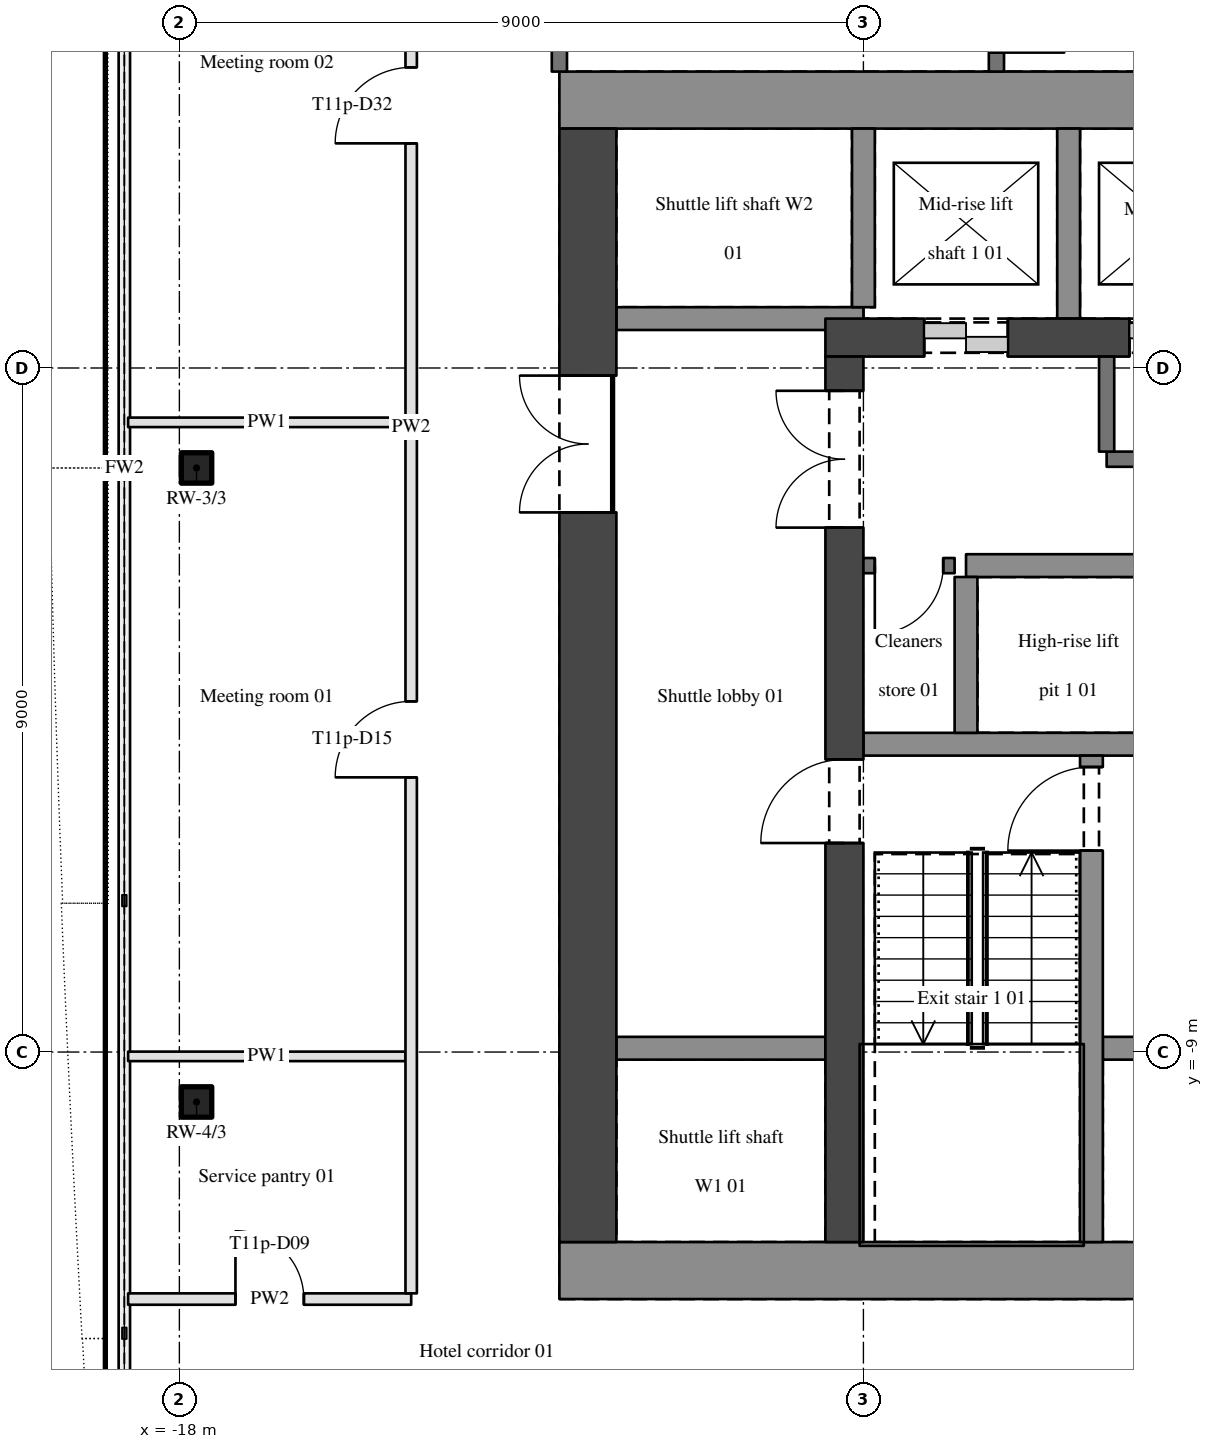
"""IFC4 building model, lengths in metres.
Left out: names, types, materials, properties, quantities, classifications, styles, units other than length and angle.
Written with IfcOpenShell. Run it as: python <this file> out.ifc"""

import sys

from ifc_helpers import new_model, si_unit, direction, frame, frame_2d, origin, origin_2d, place, context, subcontext, project, spatial, rectangle, hollow_rectangle, extrude, element, fill, save


model = new_model("IFC4")
c1 = context("Model", 3, precision=1e-05, world=origin(), true_north=direction((0.0, 1.0)))
c2 = subcontext(c1, "Body", "Model", "MODEL_VIEW")
j1 = project(units=[si_unit("LENGTHUNIT", "METRE"), si_unit("PLANEANGLEUNIT", "RADIAN")], contexts=[c1])
p1 = place(None, origin())
s1 = spatial("IfcSite", under=j1, at=p1, CompositionType="ELEMENT")
p2 = place(p1, origin())
s2 = spatial("IfcBuilding", under=s1, at=p2, CompositionType="ELEMENT")
p3 = place(p2, frame((0.0, 0.0, 158.9)))
s3 = spatial("IfcBuildingStorey", under=s2, at=p3, CompositionType="ELEMENT", Elevation=158.9)
for number, where, z_axis, x_axis in (
    (1, (-17.774, -1.315, 0.0), (0.0, 0.0, 1.0), (1.0, 0.0, 0.0)),
    (2, (-17.774, -9.657, 0.0), (0.0, 0.0, 1.0), (1.0, 0.0, 0.0)),
):
    element("IfcColumn", number, at=place(p3, frame(where, z_axis=z_axis, x_axis=x_axis)), inside=s3, PredefinedType="COLUMN", context=c2, shape_type="SweptSolid", body=[
        extrude(hollow_rectangle(XDim=0.4, YDim=0.4, WallThickness=0.02, InnerFilletRadius=0.03, OuterFilletRadius=0.05, at=origin_2d()), origin(), (0.0, 0.0, 1.0), 3.4),
    ])
for number, where, z_axis, x_axis in (
    (3, (-13.0, -11.875, 0.0), (0.0, 0.0, 1.0), (1.0, 0.0, 0.0)),
    (4, (-13.0, 3.525, 0.0), (0.0, 0.0, 1.0), (1.0, 0.0, 0.0)),
):
    element("IfcWall", number, at=place(p3, frame(where, z_axis=z_axis, x_axis=x_axis)), inside=s3, PredefinedType="SHEAR", context=c2, shape_type="SweptSolid", body=[
        extrude(rectangle(XDim=26.0, YDim=0.75, at=frame_2d((13.0, 0.0))), origin(), (0.0, 0.0, 1.0), 3.4),
    ])
p4 = place(p3, frame((-12.625, -11.5, 0.0), z_axis=(0.0, 0.0, 1.0), x_axis=(0.0, 1.0, 0.0)))
e5 = element("IfcWall", 5, at=p4, inside=s3, PredefinedType="SHEAR", context=c2, shape_type="SweptSolid", body=[
    extrude(rectangle(XDim=14.65, YDim=0.75, at=frame_2d((7.325, 0.0))), origin(), (0.0, 0.0, 1.0), 3.4),
])
p5 = place(p4, frame((9.6, 0.0, 0.0)))
e6 = element("IfcOpeningElement", 6, at=p5, cuts=e5, PredefinedType="OPENING", context=c2, shape_type="SweptSolid", body=[
    extrude(rectangle(XDim=1.8, YDim=2.1, at=frame_2d((0.9, 1.05))), frame((0.0, 0.385, 0.0), z_axis=(0.0, -1.0, 0.0), x_axis=(1.0, 0.0, 0.0)), (0.0, 0.0, 1.0), 0.77),
])
p6 = place(p3, frame((-9.5, 0.4, 0.0), z_axis=(0.0, 0.0, 1.0), x_axis=(1.0, 0.0, 0.0)))
e7 = element("IfcWall", 7, at=p6, inside=s3, PredefinedType="SHEAR", context=c2, shape_type="SweptSolid", body=[
    extrude(rectangle(XDim=19.0, YDim=0.5, at=frame_2d((9.5, 0.0))), origin(), (0.0, 0.0, 1.0), 3.4),
])
p7 = place(p6, frame((1.3, 0.0, 0.0)))
e8 = element("IfcOpeningElement", 8, at=p7, cuts=e7, PredefinedType="OPENING", context=c2, shape_type="SweptSolid", body=[
    extrude(rectangle(XDim=1.1, YDim=2.1, at=frame_2d((0.55, 1.05))), frame((0.0, 0.26, 0.0), z_axis=(0.0, -1.0, 0.0), x_axis=(1.0, 0.0, 0.0)), (0.0, 0.0, 1.0), 0.52),
])
p8 = place(p6, frame((4.0, 0.0, 0.0)))
e9 = element("IfcOpeningElement", 9, at=p8, cuts=e7, PredefinedType="OPENING", context=c2, shape_type="SweptSolid", body=[
    extrude(rectangle(XDim=1.1, YDim=2.1, at=frame_2d((0.55, 1.05))), frame((0.0, 0.26, 0.0), z_axis=(0.0, -1.0, 0.0), x_axis=(1.0, 0.0, 0.0)), (0.0, 0.0, 1.0), 0.52),
])
p9 = place(p6, frame((6.7, 0.0, 0.0)))
e10 = element("IfcOpeningElement", 10, at=p9, cuts=e7, PredefinedType="OPENING", context=c2, shape_type="SweptSolid", body=[
    extrude(rectangle(XDim=1.1, YDim=2.1, at=frame_2d((0.55, 1.05))), frame((0.0, 0.26, 0.0), z_axis=(0.0, -1.0, 0.0), x_axis=(1.0, 0.0, 0.0)), (0.0, 0.0, 1.0), 0.52),
])
p10 = place(p6, frame((11.2, 0.0, 0.0)))
e11 = element("IfcOpeningElement", 11, at=p10, cuts=e7, PredefinedType="OPENING", context=c2, shape_type="SweptSolid", body=[
    extrude(rectangle(XDim=1.1, YDim=2.1, at=frame_2d((0.55, 1.05))), frame((0.0, 0.26, 0.0), z_axis=(0.0, -1.0, 0.0), x_axis=(1.0, 0.0, 0.0)), (0.0, 0.0, 1.0), 0.52),
])
p11 = place(p6, frame((13.9, 0.0, 0.0)))
e12 = element("IfcOpeningElement", 12, at=p11, cuts=e7, PredefinedType="OPENING", context=c2, shape_type="SweptSolid", body=[
    extrude(rectangle(XDim=1.1, YDim=2.1, at=frame_2d((0.55, 1.05))), frame((0.0, 0.26, 0.0), z_axis=(0.0, -1.0, 0.0), x_axis=(1.0, 0.0, 0.0)), (0.0, 0.0, 1.0), 0.52),
])
p12 = place(p6, frame((16.6, 0.0, 0.0)))
e13 = element("IfcOpeningElement", 13, at=p12, cuts=e7, PredefinedType="OPENING", context=c2, shape_type="SweptSolid", body=[
    extrude(rectangle(XDim=1.1, YDim=2.1, at=frame_2d((0.55, 1.05))), frame((0.0, 0.26, 0.0), z_axis=(0.0, -1.0, 0.0), x_axis=(1.0, 0.0, 0.0)), (0.0, 0.0, 1.0), 0.52),
])
p13 = place(p3, frame((-9.25, -11.5, 0.0), z_axis=(0.0, 0.0, 1.0), x_axis=(0.0, 1.0, 0.0)))
e14 = element("IfcWall", 14, at=p13, inside=s3, PredefinedType="SHEAR", context=c2, shape_type="SweptSolid", body=[
    extrude(rectangle(XDim=11.65, YDim=0.5, at=frame_2d((5.825, 0.0))), origin(), (0.0, 0.0, 1.0), 3.4),
])
p14 = place(p13, frame((9.4, 0.0, 0.0)))
e15 = element("IfcOpeningElement", 15, at=p14, cuts=e14, PredefinedType="OPENING", context=c2, shape_type="SweptSolid", body=[
    extrude(rectangle(XDim=1.8, YDim=2.1, at=frame_2d((0.9, 1.05))), frame((0.0, 0.26, 0.0), z_axis=(0.0, -1.0, 0.0), x_axis=(1.0, 0.0, 0.0)), (0.0, 0.0, 1.0), 0.52),
])
p15 = place(p13, frame((5.25, 0.0, 0.0)))
e16 = element("IfcOpeningElement", 16, at=p15, cuts=e14, PredefinedType="OPENING", context=c2, shape_type="SweptSolid", body=[
    extrude(rectangle(XDim=1.1, YDim=2.1, at=frame_2d((0.55, 1.05))), frame((0.0, 0.26, 0.0), z_axis=(0.0, -1.0, 0.0), x_axis=(1.0, 0.0, 0.0)), (0.0, 0.0, 1.0), 0.52),
])
p16 = place(p3, frame((-18.674, -12.25, 0.0), z_axis=(0.0, 0.0, 1.0), x_axis=(1.0, 0.0, 0.0)))
e17 = element("IfcWall", 17, at=p16, inside=s3, PredefinedType="PARTITIONING", context=c2, shape_type="SweptSolid", body=[
    extrude(rectangle(XDim=3.724, YDim=0.15, at=frame_2d((1.862, 0.0))), origin(), (0.0, 0.0, 1.0), 2.46),
])
p17 = place(p16, frame((1.412, 0.0, 0.0)))
e18 = element("IfcOpeningElement", 18, at=p17, cuts=e17, PredefinedType="OPENING", context=c2, shape_type="SweptSolid", body=[
    extrude(rectangle(XDim=0.9, YDim=2.1, at=frame_2d((0.45, 1.05))), frame((0.0, 0.085, 0.0), z_axis=(0.0, -1.0, 0.0), x_axis=(1.0, 0.0, 0.0)), (0.0, 0.0, 1.0), 0.17),
])
p18 = place(p3, frame((-18.674, -9.057, 0.0), z_axis=(0.0, 0.0, 1.0), x_axis=(1.0, 0.0, 0.0)))
e19 = element("IfcWall", 19, at=p18, inside=s3, PredefinedType="PARTITIONING", context=c2, shape_type="SweptSolid", body=[
    extrude(rectangle(XDim=3.649, YDim=0.125, at=frame_2d((1.825, 0.0))), origin(), (0.0, 0.0, 1.0), 2.46),
])
p19 = place(p3, frame((-12.25, -8.95, 0.0), z_axis=(0.0, 0.0, 1.0), x_axis=(1.0, 0.0, 0.0)))
e20 = element("IfcWall", 20, at=p19, inside=s3, PredefinedType="SHEAR", context=c2, shape_type="SweptSolid", body=[
    extrude(rectangle(XDim=2.75, YDim=0.3, at=frame_2d((1.375, 0.0))), origin(), (0.0, 0.0, 1.0), 3.4),
])
p20 = place(p3, frame((-5.85, -8.95, 0.0), z_axis=(0.0, 0.0, 1.0), x_axis=(1.0, 0.0, 0.0)))
e21 = element("IfcWall", 21, at=p20, inside=s3, PredefinedType="SHEAR", context=c2, shape_type="SweptSolid", body=[
    extrude(rectangle(XDim=11.7, YDim=0.3, at=frame_2d((5.85, 0.0))), origin(), (0.0, 0.0, 1.0), 3.4),
])
p21 = place(p20, frame((0.8, 0.0, 0.0)))
e22 = element("IfcOpeningElement", 22, at=p21, cuts=e21, PredefinedType="OPENING", context=c2, shape_type="SweptSolid", body=[
    extrude(rectangle(XDim=1.1, YDim=2.1, at=frame_2d((0.55, 1.05))), frame((0.0, 0.16, 0.0), z_axis=(0.0, -1.0, 0.0), x_axis=(1.0, 0.0, 0.0)), (0.0, 0.0, 1.0), 0.32),
])
p22 = place(p20, frame((3.8, 0.0, 0.0)))
e23 = element("IfcOpeningElement", 23, at=p22, cuts=e21, PredefinedType="OPENING", context=c2, shape_type="SweptSolid", body=[
    extrude(rectangle(XDim=1.1, YDim=2.1, at=frame_2d((0.55, 1.05))), frame((0.0, 0.16, 0.0), z_axis=(0.0, -1.0, 0.0), x_axis=(1.0, 0.0, 0.0)), (0.0, 0.0, 1.0), 0.32),
])
p23 = place(p20, frame((6.8, 0.0, 0.0)))
e24 = element("IfcOpeningElement", 24, at=p23, cuts=e21, PredefinedType="OPENING", context=c2, shape_type="SweptSolid", body=[
    extrude(rectangle(XDim=1.1, YDim=2.1, at=frame_2d((0.55, 1.05))), frame((0.0, 0.16, 0.0), z_axis=(0.0, -1.0, 0.0), x_axis=(1.0, 0.0, 0.0)), (0.0, 0.0, 1.0), 0.32),
])
p24 = place(p20, frame((9.8, 0.0, 0.0)))
e25 = element("IfcOpeningElement", 25, at=p24, cuts=e21, PredefinedType="OPENING", context=c2, shape_type="SweptSolid", body=[
    extrude(rectangle(XDim=1.1, YDim=2.1, at=frame_2d((0.55, 1.05))), frame((0.0, 0.16, 0.0), z_axis=(0.0, -1.0, 0.0), x_axis=(1.0, 0.0, 0.0)), (0.0, 0.0, 1.0), 0.32),
])
p25 = place(p3, frame((-9.0, -4.95, 0.0), z_axis=(0.0, 0.0, 1.0), x_axis=(1.0, 0.0, 0.0)))
e26 = element("IfcWall", 26, at=p25, inside=s3, PredefinedType="SHEAR", context=c2, shape_type="SweptSolid", body=[
    extrude(rectangle(XDim=6.75, YDim=0.3, at=frame_2d((3.375, 0.0))), origin(), (0.0, 0.0, 1.0), 3.4),
])
p26 = place(p3, frame((-7.8, -2.6, 0.0), z_axis=(0.0, 0.0, 1.0), x_axis=(-1.0, 0.0, 0.0)))
e27 = element("IfcWall", 27, at=p26, inside=s3, PredefinedType="SOLIDWALL", context=c2, shape_type="SweptSolid", body=[
    extrude(rectangle(XDim=1.2, YDim=0.2, at=frame_2d((0.6, 0.0))), origin(), (0.0, 0.0, 1.0), 3.1),
])
p27 = place(p26, frame((0.15, 0.0, 0.0)))
e28 = element("IfcOpeningElement", 28, at=p27, cuts=e27, PredefinedType="OPENING", context=c2, shape_type="SweptSolid", body=[
    extrude(rectangle(XDim=0.9, YDim=2.1, at=frame_2d((0.45, 1.05))), frame((0.0, 0.11, 0.0), z_axis=(0.0, -1.0, 0.0), x_axis=(1.0, 0.0, 0.0)), (0.0, 0.0, 1.0), 0.22),
])
p28 = place(p3, frame((-7.65, -2.6, 0.0), z_axis=(0.0, 0.0, 1.0), x_axis=(1.0, 0.0, 0.0)))
e29 = element("IfcWall", 29, at=p28, inside=s3, PredefinedType="SHEAR", context=c2, shape_type="SweptSolid", body=[
    extrude(rectangle(XDim=5.4, YDim=0.3, at=frame_2d((2.7, 0.0))), origin(), (0.0, 0.0, 1.0), 3.4),
])
p29 = place(p3, frame((-5.8, -1.2, 0.0), z_axis=(0.0, 0.0, 1.0), x_axis=(1.0, 0.0, 0.0)))
e30 = element("IfcWall", 30, at=p29, inside=s3, PredefinedType="SOLIDWALL", context=c2, shape_type="SweptSolid", body=[
    extrude(rectangle(XDim=4.6, YDim=0.2, at=frame_2d((2.3, 0.0))), origin(), (0.0, 0.0, 1.0), 3.1),
])
p30 = place(p29, frame((1.85, 0.0, 0.0)))
e31 = element("IfcOpeningElement", 31, at=p30, cuts=e30, PredefinedType="OPENING", context=c2, shape_type="SweptSolid", body=[
    extrude(rectangle(XDim=0.9, YDim=2.1, at=frame_2d((0.45, 1.05))), frame((0.0, 0.11, 0.0), z_axis=(0.0, -1.0, 0.0), x_axis=(1.0, 0.0, 0.0)), (0.0, 0.0, 1.0), 0.22),
])
p31 = place(p3, frame((-18.674, -0.715, 0.0), z_axis=(0.0, 0.0, 1.0), x_axis=(1.0, 0.0, 0.0)))
e32 = element("IfcWall", 32, at=p31, inside=s3, PredefinedType="PARTITIONING", context=c2, shape_type="SweptSolid", body=[
    extrude(rectangle(XDim=3.649, YDim=0.125, at=frame_2d((1.825, 0.0))), origin(), (0.0, 0.0, 1.0), 2.46),
])
p32 = place(p3, frame((-9.0, 0.65, 0.0), z_axis=(0.0, 0.0, 1.0), x_axis=(-1.0, 0.0, 0.0)))
e33 = element("IfcWall", 33, at=p32, inside=s3, PredefinedType="SHEAR", context=c2, shape_type="SweptSolid", body=[
    extrude(rectangle(XDim=3.25, YDim=0.3, at=frame_2d((1.625, 0.0))), origin(), (0.0, 0.0, 1.0), 3.4),
])
p33 = place(p3, frame((-14.95, -12.175, 0.0), z_axis=(0.0, 0.0, 1.0), x_axis=(0.0, 1.0, 0.0)))
e34 = element("IfcWall", 34, at=p33, inside=s3, PredefinedType="PARTITIONING", context=c2, shape_type="SweptSolid", body=[
    extrude(rectangle(XDim=22.8, YDim=0.15, at=frame_2d((11.4, 0.0))), origin(), (0.0, 0.0, 1.0), 2.46),
])
p34 = place(p33, frame((6.789, 0.0, 0.0)))
e35 = element("IfcOpeningElement", 35, at=p34, cuts=e34, PredefinedType="OPENING", context=c2, shape_type="SweptSolid", body=[
    extrude(rectangle(XDim=1.0, YDim=2.1, at=frame_2d((0.5, 1.05))), frame((0.0, 0.085, 0.0), z_axis=(0.0, -1.0, 0.0), x_axis=(1.0, 0.0, 0.0)), (0.0, 0.0, 1.0), 0.17),
])
p35 = place(p33, frame((15.131, 0.0, 0.0)))
e36 = element("IfcOpeningElement", 36, at=p35, cuts=e34, PredefinedType="OPENING", context=c2, shape_type="SweptSolid", body=[
    extrude(rectangle(XDim=1.0, YDim=2.1, at=frame_2d((0.5, 1.05))), frame((0.0, 0.085, 0.0), z_axis=(0.0, -1.0, 0.0), x_axis=(1.0, 0.0, 0.0)), (0.0, 0.0, 1.0), 0.17),
])
p36 = place(p3, frame((-13.0, 3.9, 0.0), z_axis=(0.0, 0.0, 1.0), x_axis=(0.0, 1.0, 0.0)))
e37 = element("IfcWall", 37, at=p36, inside=s3, PredefinedType="SOLIDWALL", context=c2, shape_type="SweptSolid", body=[
    extrude(rectangle(XDim=6.7, YDim=0.2, at=frame_2d((3.35, 0.0))), origin(), (0.0, 0.0, 1.0), 2.46),
])
p37 = place(p3, frame((-9.0, 0.8, 0.0), z_axis=(0.0, 0.0, 1.0), x_axis=(0.0, 1.0, 0.0)))
e38 = element("IfcWall", 38, at=p37, inside=s3, PredefinedType="SHEAR", context=c2, shape_type="SweptSolid", body=[
    extrude(rectangle(XDim=2.35, YDim=0.3, at=frame_2d((1.175, 0.0))), origin(), (0.0, 0.0, 1.0), 3.4),
])
p38 = place(p3, frame((-7.65, -4.8, 0.0), z_axis=(0.0, 0.0, 1.0), x_axis=(0.0, 1.0, 0.0)))
e39 = element("IfcWall", 39, at=p38, inside=s3, PredefinedType="SHEAR", context=c2, shape_type="SweptSolid", body=[
    extrude(rectangle(XDim=2.05, YDim=0.3, at=frame_2d((1.025, 0.0))), origin(), (0.0, 0.0, 1.0), 3.4),
])
p39 = place(p3, frame((-7.25, 5.3, 0.0), z_axis=(0.0, 0.0, 1.0), x_axis=(0.0, -1.0, 0.0)))
e40 = element("IfcWall", 40, at=p39, inside=s3, PredefinedType="SOLIDWALL", context=c2, shape_type="SweptSolid", body=[
    extrude(rectangle(XDim=1.4, YDim=0.2, at=frame_2d((0.7, 0.0))), origin(), (0.0, 0.0, 1.0), 2.46),
])
p40 = place(p39, frame((0.25, 0.0, 0.0)))
e41 = element("IfcOpeningElement", 41, at=p40, cuts=e40, PredefinedType="OPENING", context=c2, shape_type="SweptSolid", body=[
    extrude(rectangle(XDim=0.9, YDim=2.1, at=frame_2d((0.45, 1.05))), frame((0.0, 0.11, 0.0), z_axis=(0.0, -1.0, 0.0), x_axis=(1.0, 0.0, 0.0)), (0.0, 0.0, 1.0), 0.22),
])
p41 = place(p3, frame((-6.3, 0.65, 0.0), z_axis=(0.0, 0.0, 1.0), x_axis=(0.0, 1.0, 0.0)))
e42 = element("IfcWall", 42, at=p41, inside=s3, PredefinedType="SHEAR", context=c2, shape_type="SweptSolid", body=[
    extrude(rectangle(XDim=2.5, YDim=0.3, at=frame_2d((1.25, 0.0))), origin(), (0.0, 0.0, 1.0), 3.4),
])
p42 = place(p3, frame((-6.0, -11.5, 0.0), z_axis=(0.0, 0.0, 1.0), x_axis=(0.0, 1.0, 0.0)))
e43 = element("IfcWall", 43, at=p42, inside=s3, PredefinedType="SHEAR", context=c2, shape_type="SweptSolid", body=[
    extrude(rectangle(XDim=6.4, YDim=0.3, at=frame_2d((3.2, 0.0))), origin(), (0.0, 0.0, 1.0), 3.4),
])
p43 = place(p42, frame((5.15, 0.0, 0.0)))
e44 = element("IfcOpeningElement", 44, at=p43, cuts=e43, PredefinedType="OPENING", context=c2, shape_type="SweptSolid", body=[
    extrude(rectangle(XDim=1.1, YDim=2.1, at=frame_2d((0.55, 1.05))), frame((0.0, 0.16, 0.0), z_axis=(0.0, -1.0, 0.0), x_axis=(1.0, 0.0, 0.0)), (0.0, 0.0, 1.0), 0.32),
])
p44 = place(p3, frame((-5.8, -1.1, 0.0), z_axis=(0.0, 0.0, 1.0), x_axis=(0.0, 1.0, 0.0)))
e45 = element("IfcWall", 45, at=p44, inside=s3, PredefinedType="SOLIDWALL", context=c2, shape_type="SweptSolid", body=[
    extrude(rectangle(XDim=1.25, YDim=0.2, at=frame_2d((0.625, 0.0))), origin(), (0.0, 0.0, 1.0), 3.1),
])
p45 = place(p5, origin())
e46 = element("IfcDoor", 46, at=p45, inside=s3, OperationType="DOUBLE_DOOR_SINGLE_SWING", PredefinedType="DOOR", context=c2, shape_type="SweptSolid", body=[
    extrude(rectangle(XDim=1.8, YDim=2.1, at=frame_2d((0.9, 1.05))), frame((0.0, 0.025, 0.0), z_axis=(0.0, -1.0, 0.0), x_axis=(1.0, 0.0, 0.0)), (0.0, 0.0, 1.0), 0.05),
])
fill(e6, e46)
p46 = place(p14, origin())
e47 = element("IfcDoor", 47, at=p46, inside=s3, OperationType="DOUBLE_DOOR_SINGLE_SWING", PredefinedType="DOOR", context=c2, shape_type="SweptSolid", body=[
    extrude(rectangle(XDim=1.8, YDim=2.1, at=frame_2d((0.9, 1.05))), frame((0.0, 0.025, 0.0), z_axis=(0.0, -1.0, 0.0), x_axis=(1.0, 0.0, 0.0)), (0.0, 0.0, 1.0), 0.05),
])
fill(e15, e47)
p47 = place(p43, origin())
e48 = element("IfcDoor", 48, at=p47, inside=s3, OperationType="SINGLE_SWING_LEFT", PredefinedType="DOOR", context=c2, shape_type="SweptSolid", body=[
    extrude(rectangle(XDim=1.1, YDim=2.1, at=frame_2d((0.55, 1.05))), frame((0.0, 0.025, 0.0), z_axis=(0.0, -1.0, 0.0), x_axis=(1.0, 0.0, 0.0)), (0.0, 0.0, 1.0), 0.05),
])
fill(e44, e48)
p48 = place(p15, origin())
e49 = element("IfcDoor", 49, at=p48, inside=s3, OperationType="SINGLE_SWING_LEFT", PredefinedType="DOOR", context=c2, shape_type="SweptSolid", body=[
    extrude(rectangle(XDim=1.1, YDim=2.1, at=frame_2d((0.55, 1.05))), frame((0.0, 0.025, 0.0), z_axis=(0.0, -1.0, 0.0), x_axis=(1.0, 0.0, 0.0)), (0.0, 0.0, 1.0), 0.05),
])
fill(e16, e49)
p49 = place(p27, origin())
e50 = element("IfcDoor", 50, at=p49, inside=s3, OperationType="SINGLE_SWING_RIGHT", PredefinedType="DOOR", context=c2, shape_type="SweptSolid", body=[
    extrude(rectangle(XDim=0.9, YDim=2.1, at=frame_2d((0.45, 1.05))), frame((0.0, 0.025, 0.0), z_axis=(0.0, -1.0, 0.0), x_axis=(1.0, 0.0, 0.0)), (0.0, 0.0, 1.0), 0.05),
])
fill(e28, e50)
p50 = place(p17, origin())
e51 = element("IfcDoor", 51, at=p50, inside=s3, OperationType="SINGLE_SWING_LEFT", PredefinedType="DOOR", context=c2, shape_type="SweptSolid", body=[
    extrude(rectangle(XDim=0.9, YDim=2.1, at=frame_2d((0.45, 1.05))), frame((0.0, 0.025, 0.0), z_axis=(0.0, -1.0, 0.0), x_axis=(1.0, 0.0, 0.0)), (0.0, 0.0, 1.0), 0.05),
])
fill(e18, e51)
p51 = place(p34, origin())
e52 = element("IfcDoor", 52, at=p51, inside=s3, OperationType="SINGLE_SWING_LEFT", PredefinedType="DOOR", context=c2, shape_type="SweptSolid", body=[
    extrude(rectangle(XDim=1.0, YDim=2.1, at=frame_2d((0.5, 1.05))), frame((0.0, 0.025, 0.0), z_axis=(0.0, -1.0, 0.0), x_axis=(1.0, 0.0, 0.0)), (0.0, 0.0, 1.0), 0.05),
])
fill(e35, e52)
p52 = place(p35, origin())
e53 = element("IfcDoor", 53, at=p52, inside=s3, OperationType="SINGLE_SWING_LEFT", PredefinedType="DOOR", context=c2, shape_type="SweptSolid", body=[
    extrude(rectangle(XDim=1.0, YDim=2.1, at=frame_2d((0.5, 1.05))), frame((0.0, 0.025, 0.0), z_axis=(0.0, -1.0, 0.0), x_axis=(1.0, 0.0, 0.0)), (0.0, 0.0, 1.0), 0.05),
])
fill(e36, e53)
p53 = place(p7, origin())
e54 = element("IfcDoor", 54, at=p53, inside=s3, OperationType="DOUBLE_DOOR_SLIDING", PredefinedType="DOOR", context=c2, shape_type="SweptSolid", body=[
    extrude(rectangle(XDim=1.1, YDim=2.1, at=frame_2d((0.55, 1.05))), frame((0.0, 0.025, 0.0), z_axis=(0.0, -1.0, 0.0), x_axis=(1.0, 0.0, 0.0)), (0.0, 0.0, 1.0), 0.05),
])
fill(e8, e54)
p54 = place(p8, origin())
e55 = element("IfcDoor", 55, at=p54, inside=s3, OperationType="DOUBLE_DOOR_SLIDING", PredefinedType="DOOR", context=c2, shape_type="SweptSolid", body=[
    extrude(rectangle(XDim=1.1, YDim=2.1, at=frame_2d((0.55, 1.05))), frame((0.0, 0.025, 0.0), z_axis=(0.0, -1.0, 0.0), x_axis=(1.0, 0.0, 0.0)), (0.0, 0.0, 1.0), 0.05),
])
fill(e9, e55)
save(model, sys.argv[1])
